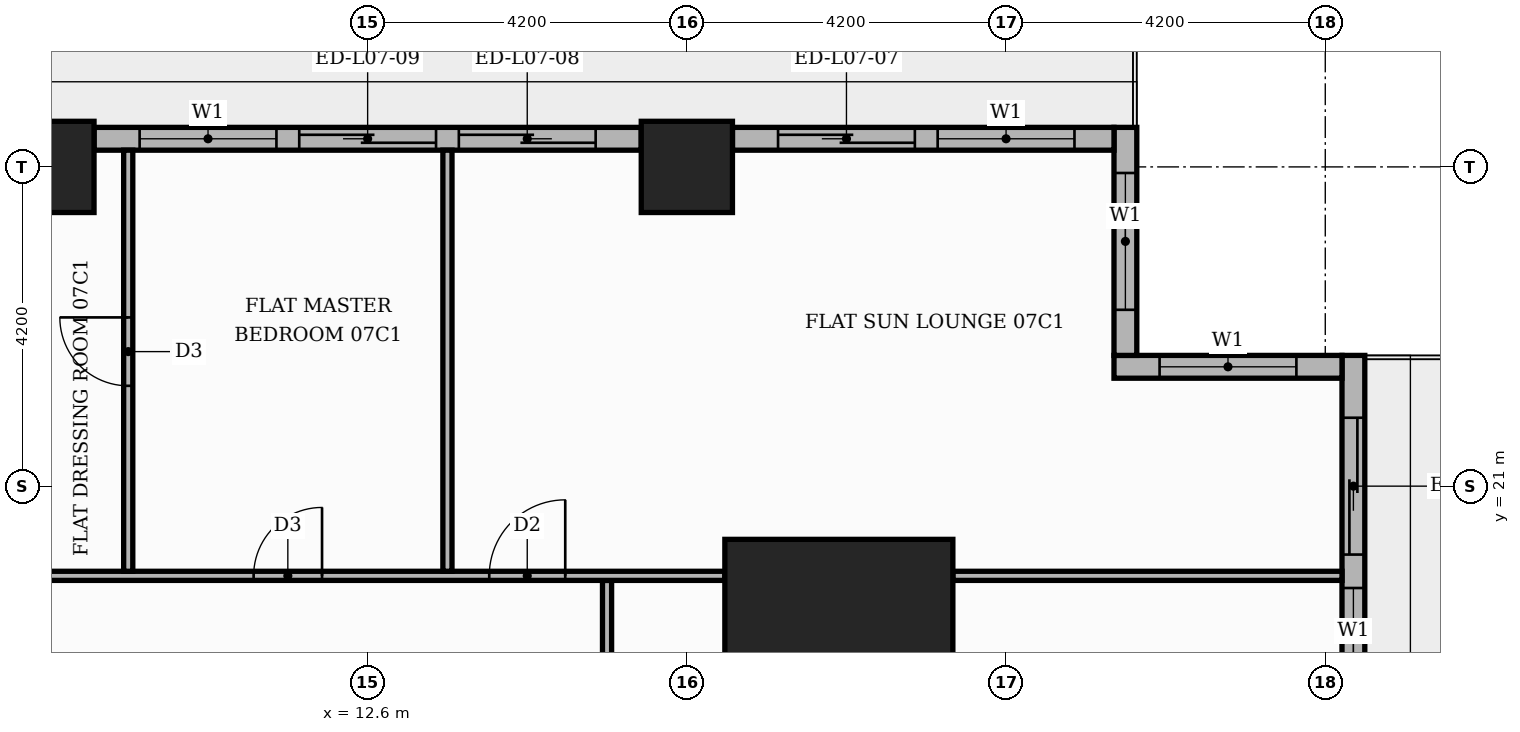
"""IFC4 building model, lengths in metres.
Left out: names, types, materials, properties, quantities, classifications, styles, units other than length and angle.
Written with IfcOpenShell. Run it as: python <this file> out.ifc"""

import sys

from ifc_helpers import new_model, si_unit, direction, frame, frame_2d, origin, origin_2d, place, context, subcontext, project, spatial, rectangle, extrude, element, fill, save


model = new_model("IFC4")
c1 = context("Model", 3, precision=1e-05, world=origin(), true_north=direction((0.0, 1.0)))
c2 = subcontext(c1, "Body", "Model", "MODEL_VIEW")
j1 = project(units=[si_unit("LENGTHUNIT", "METRE"), si_unit("PLANEANGLEUNIT", "RADIAN")], contexts=[c1])
p1 = place(None, origin())
s1 = spatial("IfcSite", under=j1, at=p1, CompositionType="ELEMENT")
p2 = place(p1, origin())
s2 = spatial("IfcBuilding", under=s1, at=p2, CompositionType="ELEMENT")
p3 = place(p2, frame((0.0, 0.0, 34.8)))
s3 = spatial("IfcBuildingStorey", under=s2, at=p3, CompositionType="ELEMENT", Elevation=34.8)
p4 = place(p3, frame((18.8, 18.8, 0.0), z_axis=(0.0, 0.0, 1.0), x_axis=(1.0, 0.0, 0.0)))
e1 = element("IfcColumn", 1, at=p4, inside=s3, PredefinedType="COLUMN", context=c2, shape_type="SweptSolid", body=[
    extrude(rectangle(XDim=3.0, YDim=3.0, at=origin_2d()), origin(), (0.0, 0.0, 1.0), 3.9),
])
for number, where, z_axis, x_axis in (
    (2, (8.4, 25.2, 0.0), (0.0, 0.0, 1.0), (1.0, 0.0, 0.0)),
    (3, (16.8, 25.2, 0.0), (0.0, 0.0, 1.0), (1.0, 0.0, 0.0)),
):
    element("IfcColumn", number, at=place(p3, frame(where, z_axis=z_axis, x_axis=x_axis)), inside=s3, PredefinedType="COLUMN", context=c2, shape_type="SweptSolid", body=[
        extrude(rectangle(XDim=1.2, YDim=1.2, at=origin_2d()), origin(), (0.0, 0.0, 1.0), 3.9),
    ])
p5 = place(p3, frame((25.57, 17.4, 0.0), z_axis=(0.0, 0.0, 1.0), x_axis=(0.0, 1.0, 0.0)))
e4 = element("IfcWall", 4, at=p5, inside=s3, PredefinedType="STANDARD", context=c2, shape_type="SweptSolid", body=[
    extrude(rectangle(XDim=5.32, YDim=0.3, at=frame_2d((2.66, 0.0))), origin(), (0.0, 0.0, 1.0), 3.48),
])
p6 = place(p5, frame((2.7, 0.0, 0.0)))
e5 = element("IfcOpeningElement", 5, at=p6, cuts=e4, PredefinedType="OPENING", context=c2, shape_type="SweptSolid", body=[
    extrude(rectangle(XDim=1.8, YDim=2.4, at=frame_2d((0.9, 1.2))), frame((0.0, 0.16, 0.0), z_axis=(0.0, -1.0, 0.0), x_axis=(1.0, 0.0, 0.0)), (0.0, 0.0, 1.0), 0.32),
])
p7 = place(p5, frame((0.46, 0.0, 0.9)))
e6 = element("IfcOpeningElement", 6, at=p7, cuts=e4, PredefinedType="OPENING", context=c2, shape_type="SweptSolid", body=[
    extrude(rectangle(XDim=1.8, YDim=2.1, at=frame_2d((0.9, 1.05))), frame((0.0, 0.16, 0.0), z_axis=(0.0, -1.0, 0.0), x_axis=(1.0, 0.0, 0.0)), (0.0, 0.0, 1.0), 0.32),
])
p8 = place(p3, frame((25.42, 22.57, 0.0), z_axis=(0.0, 0.0, 1.0), x_axis=(-1.0, 0.0, 0.0)))
e7 = element("IfcWall", 7, at=p8, inside=s3, PredefinedType="STANDARD", context=c2, shape_type="SweptSolid", body=[
    extrude(rectangle(XDim=3.0, YDim=0.3, at=frame_2d((1.5, 0.0))), origin(), (0.0, 0.0, 1.0), 3.48),
])
p9 = place(p8, frame((0.6, 0.0, 0.9)))
e8 = element("IfcOpeningElement", 8, at=p9, cuts=e7, PredefinedType="OPENING", context=c2, shape_type="SweptSolid", body=[
    extrude(rectangle(XDim=1.8, YDim=2.1, at=frame_2d((0.9, 1.05))), frame((0.0, 0.16, 0.0), z_axis=(0.0, -1.0, 0.0), x_axis=(1.0, 0.0, 0.0)), (0.0, 0.0, 1.0), 0.32),
])
p10 = place(p3, frame((22.57, 22.72, 0.0), z_axis=(0.0, 0.0, 1.0), x_axis=(0.0, 1.0, 0.0)))
e9 = element("IfcWall", 9, at=p10, inside=s3, PredefinedType="STANDARD", context=c2, shape_type="SweptSolid", body=[
    extrude(rectangle(XDim=3.0, YDim=0.3, at=frame_2d((1.5, 0.0))), origin(), (0.0, 0.0, 1.0), 3.48),
])
p11 = place(p10, frame((0.6, 0.0, 0.9)))
e10 = element("IfcOpeningElement", 10, at=p11, cuts=e9, PredefinedType="OPENING", context=c2, shape_type="SweptSolid", body=[
    extrude(rectangle(XDim=1.8, YDim=2.1, at=frame_2d((0.9, 1.05))), frame((0.0, 0.16, 0.0), z_axis=(0.0, -1.0, 0.0), x_axis=(1.0, 0.0, 0.0)), (0.0, 0.0, 1.0), 0.32),
])
p12 = place(p3, frame((22.42, 25.57, 0.0), z_axis=(0.0, 0.0, 1.0), x_axis=(-1.0, 0.0, 0.0)))
e11 = element("IfcWall", 11, at=p12, inside=s3, PredefinedType="STANDARD", context=c2, shape_type="SweptSolid", body=[
    extrude(rectangle(XDim=5.02, YDim=0.3, at=frame_2d((2.51, 0.0))), origin(), (0.0, 0.0, 1.0), 3.48),
])
p13 = place(p12, frame((0.52, 0.0, 0.9)))
e12 = element("IfcOpeningElement", 12, at=p13, cuts=e11, PredefinedType="OPENING", context=c2, shape_type="SweptSolid", body=[
    extrude(rectangle(XDim=1.8, YDim=2.1, at=frame_2d((0.9, 1.05))), frame((0.0, 0.16, 0.0), z_axis=(0.0, -1.0, 0.0), x_axis=(1.0, 0.0, 0.0)), (0.0, 0.0, 1.0), 0.32),
])
p14 = place(p12, frame((2.62, 0.0, 0.0)))
e13 = element("IfcOpeningElement", 13, at=p14, cuts=e11, PredefinedType="OPENING", context=c2, shape_type="SweptSolid", body=[
    extrude(rectangle(XDim=1.8, YDim=2.4, at=frame_2d((0.9, 1.2))), frame((0.0, 0.16, 0.0), z_axis=(0.0, -1.0, 0.0), x_axis=(1.0, 0.0, 0.0)), (0.0, 0.0, 1.0), 0.32),
])
p15 = place(p3, frame((16.2, 25.57, 0.0), z_axis=(0.0, 0.0, 1.0), x_axis=(-1.0, 0.0, 0.0)))
e14 = element("IfcWall", 14, at=p15, inside=s3, PredefinedType="STANDARD", context=c2, shape_type="SweptSolid", body=[
    extrude(rectangle(XDim=7.2, YDim=0.3, at=frame_2d((3.6, 0.0))), origin(), (0.0, 0.0, 1.0), 3.48),
])
p16 = place(p15, frame((0.6, 0.0, 0.0)))
e15 = element("IfcOpeningElement", 15, at=p16, cuts=e14, PredefinedType="OPENING", context=c2, shape_type="SweptSolid", body=[
    extrude(rectangle(XDim=1.8, YDim=2.4, at=frame_2d((0.9, 1.2))), frame((0.0, 0.16, 0.0), z_axis=(0.0, -1.0, 0.0), x_axis=(1.0, 0.0, 0.0)), (0.0, 0.0, 1.0), 0.32),
])
p17 = place(p15, frame((2.7, 0.0, 0.0)))
e16 = element("IfcOpeningElement", 16, at=p17, cuts=e14, PredefinedType="OPENING", context=c2, shape_type="SweptSolid", body=[
    extrude(rectangle(XDim=1.8, YDim=2.4, at=frame_2d((0.9, 1.2))), frame((0.0, 0.16, 0.0), z_axis=(0.0, -1.0, 0.0), x_axis=(1.0, 0.0, 0.0)), (0.0, 0.0, 1.0), 0.32),
])
p18 = place(p15, frame((4.8, 0.0, 0.9)))
e17 = element("IfcOpeningElement", 17, at=p18, cuts=e14, PredefinedType="OPENING", context=c2, shape_type="SweptSolid", body=[
    extrude(rectangle(XDim=1.8, YDim=2.1, at=frame_2d((0.9, 1.05))), frame((0.0, 0.16, 0.0), z_axis=(0.0, -1.0, 0.0), x_axis=(1.0, 0.0, 0.0)), (0.0, 0.0, 1.0), 0.32),
])
p19 = place(p3, frame((15.75, 13.75, 0.0), z_axis=(0.0, 0.0, 1.0), x_axis=(0.0, 1.0, 0.0)))
e18 = element("IfcWall", 18, at=p19, inside=s3, PredefinedType="PARTITIONING", context=c2, shape_type="SweptSolid", body=[
    extrude(rectangle(XDim=6.01, YDim=0.12, at=frame_2d((3.005, 0.0))), origin(), (0.0, 0.0, 1.0), 3.48),
])
p20 = place(p19, frame((2.485, 0.0, 0.0)))
e19 = element("IfcOpeningElement", 19, at=p20, cuts=e18, PredefinedType="OPENING", context=c2, shape_type="SweptSolid", body=[
    extrude(rectangle(XDim=1.0, YDim=2.1, at=frame_2d((0.5, 1.05))), frame((0.0, 0.07, 0.0), z_axis=(0.0, -1.0, 0.0), x_axis=(1.0, 0.0, 0.0)), (0.0, 0.0, 1.0), 0.14),
])
p21 = place(p3, frame((5.35, 19.82, 0.0), z_axis=(0.0, 0.0, 1.0), x_axis=(1.0, 0.0, 0.0)))
e20 = element("IfcWall", 20, at=p21, inside=s3, PredefinedType="PARTITIONING", context=c2, shape_type="SweptSolid", body=[
    extrude(rectangle(XDim=11.95, YDim=0.12, at=frame_2d((5.975, 0.0))), origin(), (0.0, 0.0, 1.0), 3.48),
])
p22 = place(p21, frame((8.85, 0.0, 0.0)))
e21 = element("IfcOpeningElement", 21, at=p22, cuts=e20, PredefinedType="OPENING", context=c2, shape_type="SweptSolid", body=[
    extrude(rectangle(XDim=1.0, YDim=2.1, at=frame_2d((0.5, 1.05))), frame((0.0, 0.07, 0.0), z_axis=(0.0, -1.0, 0.0), x_axis=(1.0, 0.0, 0.0)), (0.0, 0.0, 1.0), 0.14),
])
p23 = place(p21, frame((5.75, 0.0, 0.0)))
e22 = element("IfcOpeningElement", 22, at=p23, cuts=e20, PredefinedType="OPENING", context=c2, shape_type="SweptSolid", body=[
    extrude(rectangle(XDim=0.9, YDim=2.1, at=frame_2d((0.45, 1.05))), frame((0.0, 0.07, 0.0), z_axis=(0.0, -1.0, 0.0), x_axis=(1.0, 0.0, 0.0)), (0.0, 0.0, 1.0), 0.14),
])
p24 = place(p3, frame((20.3, 19.82, 0.0), z_axis=(0.0, 0.0, 1.0), x_axis=(1.0, 0.0, 0.0)))
e23 = element("IfcWall", 23, at=p24, inside=s3, PredefinedType="PARTITIONING", context=c2, shape_type="SweptSolid", body=[
    extrude(rectangle(XDim=5.12, YDim=0.12, at=frame_2d((2.56, 0.0))), origin(), (0.0, 0.0, 1.0), 3.48),
])
p25 = place(p3, frame((9.45, 19.88, 0.0), z_axis=(0.0, 0.0, 1.0), x_axis=(0.0, 1.0, 0.0)))
e24 = element("IfcWall", 24, at=p25, inside=s3, PredefinedType="PARTITIONING", context=c2, shape_type="SweptSolid", body=[
    extrude(rectangle(XDim=5.54, YDim=0.12, at=frame_2d((2.77, 0.0))), origin(), (0.0, 0.0, 1.0), 3.48),
])
p26 = place(p25, frame((2.44, 0.0, 0.0)))
e25 = element("IfcOpeningElement", 25, at=p26, cuts=e24, PredefinedType="OPENING", context=c2, shape_type="SweptSolid", body=[
    extrude(rectangle(XDim=0.9, YDim=2.1, at=frame_2d((0.45, 1.05))), frame((0.0, 0.07, 0.0), z_axis=(0.0, -1.0, 0.0), x_axis=(1.0, 0.0, 0.0)), (0.0, 0.0, 1.0), 0.14),
])
p27 = place(p3, frame((13.65, 19.88, 0.0), z_axis=(0.0, 0.0, 1.0), x_axis=(0.0, 1.0, 0.0)))
e26 = element("IfcWall", 26, at=p27, inside=s3, PredefinedType="PARTITIONING", context=c2, shape_type="SweptSolid", body=[
    extrude(rectangle(XDim=5.54, YDim=0.12, at=frame_2d((2.77, 0.0))), origin(), (0.0, 0.0, 1.0), 3.48),
])
p28 = place(p6, origin())
e27 = element("IfcDoor", 27, at=p28, inside=s3, OperationType="SLIDING_TO_LEFT", PredefinedType="DOOR", context=c2, shape_type="SweptSolid", body=[
    extrude(rectangle(XDim=1.8, YDim=2.4, at=frame_2d((0.9, 1.2))), frame((0.0, 0.025, 0.0), z_axis=(0.0, -1.0, 0.0), x_axis=(1.0, 0.0, 0.0)), (0.0, 0.0, 1.0), 0.05),
])
fill(e5, e27)
p29 = place(p7, origin())
e28 = element("IfcWindow", 28, at=p29, inside=s3, PartitioningType="SINGLE_PANEL", PredefinedType="WINDOW", context=c2, shape_type="SweptSolid", body=[
    extrude(rectangle(XDim=1.8, YDim=2.1, at=frame_2d((0.9, 1.05))), frame((0.0, 0.03, 0.0), z_axis=(0.0, -1.0, 0.0), x_axis=(1.0, 0.0, 0.0)), (0.0, 0.0, 1.0), 0.06),
])
fill(e6, e28)
p30 = place(p9, origin())
e29 = element("IfcWindow", 29, at=p30, inside=s3, PartitioningType="SINGLE_PANEL", PredefinedType="WINDOW", context=c2, shape_type="SweptSolid", body=[
    extrude(rectangle(XDim=1.8, YDim=2.1, at=frame_2d((0.9, 1.05))), frame((0.0, 0.03, 0.0), z_axis=(0.0, -1.0, 0.0), x_axis=(1.0, 0.0, 0.0)), (0.0, 0.0, 1.0), 0.06),
])
fill(e8, e29)
p31 = place(p11, origin())
e30 = element("IfcWindow", 30, at=p31, inside=s3, PartitioningType="SINGLE_PANEL", PredefinedType="WINDOW", context=c2, shape_type="SweptSolid", body=[
    extrude(rectangle(XDim=1.8, YDim=2.1, at=frame_2d((0.9, 1.05))), frame((0.0, 0.03, 0.0), z_axis=(0.0, -1.0, 0.0), x_axis=(1.0, 0.0, 0.0)), (0.0, 0.0, 1.0), 0.06),
])
fill(e10, e30)
p32 = place(p13, origin())
e31 = element("IfcWindow", 31, at=p32, inside=s3, PartitioningType="SINGLE_PANEL", PredefinedType="WINDOW", context=c2, shape_type="SweptSolid", body=[
    extrude(rectangle(XDim=1.8, YDim=2.1, at=frame_2d((0.9, 1.05))), frame((0.0, 0.03, 0.0), z_axis=(0.0, -1.0, 0.0), x_axis=(1.0, 0.0, 0.0)), (0.0, 0.0, 1.0), 0.06),
])
fill(e12, e31)
p33 = place(p14, origin())
e32 = element("IfcDoor", 32, at=p33, inside=s3, OperationType="SLIDING_TO_RIGHT", PredefinedType="DOOR", context=c2, shape_type="SweptSolid", body=[
    extrude(rectangle(XDim=1.8, YDim=2.4, at=frame_2d((0.9, 1.2))), frame((0.0, 0.025, 0.0), z_axis=(0.0, -1.0, 0.0), x_axis=(1.0, 0.0, 0.0)), (0.0, 0.0, 1.0), 0.05),
])
fill(e13, e32)
p34 = place(p16, origin())
e33 = element("IfcDoor", 33, at=p34, inside=s3, OperationType="SLIDING_TO_LEFT", PredefinedType="DOOR", context=c2, shape_type="SweptSolid", body=[
    extrude(rectangle(XDim=1.8, YDim=2.4, at=frame_2d((0.9, 1.2))), frame((0.0, 0.025, 0.0), z_axis=(0.0, -1.0, 0.0), x_axis=(1.0, 0.0, 0.0)), (0.0, 0.0, 1.0), 0.05),
])
fill(e15, e33)
p35 = place(p17, origin())
e34 = element("IfcDoor", 34, at=p35, inside=s3, OperationType="SLIDING_TO_RIGHT", PredefinedType="DOOR", context=c2, shape_type="SweptSolid", body=[
    extrude(rectangle(XDim=1.8, YDim=2.4, at=frame_2d((0.9, 1.2))), frame((0.0, 0.025, 0.0), z_axis=(0.0, -1.0, 0.0), x_axis=(1.0, 0.0, 0.0)), (0.0, 0.0, 1.0), 0.05),
])
fill(e16, e34)
p36 = place(p18, origin())
e35 = element("IfcWindow", 35, at=p36, inside=s3, PartitioningType="SINGLE_PANEL", PredefinedType="WINDOW", context=c2, shape_type="SweptSolid", body=[
    extrude(rectangle(XDim=1.8, YDim=2.1, at=frame_2d((0.9, 1.05))), frame((0.0, 0.03, 0.0), z_axis=(0.0, -1.0, 0.0), x_axis=(1.0, 0.0, 0.0)), (0.0, 0.0, 1.0), 0.06),
])
fill(e17, e35)
p37 = place(p22, origin())
e36 = element("IfcDoor", 36, at=p37, inside=s3, OperationType="SINGLE_SWING_RIGHT", PredefinedType="DOOR", context=c2, shape_type="SweptSolid", body=[
    extrude(rectangle(XDim=1.0, YDim=2.1, at=frame_2d((0.5, 1.05))), frame((0.0, 0.025, 0.0), z_axis=(0.0, -1.0, 0.0), x_axis=(1.0, 0.0, 0.0)), (0.0, 0.0, 1.0), 0.05),
])
fill(e21, e36)
p38 = place(p23, origin())
e37 = element("IfcDoor", 37, at=p38, inside=s3, OperationType="SINGLE_SWING_RIGHT", PredefinedType="DOOR", context=c2, shape_type="SweptSolid", body=[
    extrude(rectangle(XDim=0.9, YDim=2.1, at=frame_2d((0.45, 1.05))), frame((0.0, 0.025, 0.0), z_axis=(0.0, -1.0, 0.0), x_axis=(1.0, 0.0, 0.0)), (0.0, 0.0, 1.0), 0.05),
])
fill(e22, e37)
p39 = place(p26, origin())
e38 = element("IfcDoor", 38, at=p39, inside=s3, OperationType="SINGLE_SWING_RIGHT", PredefinedType="DOOR", context=c2, shape_type="SweptSolid", body=[
    extrude(rectangle(XDim=0.9, YDim=2.1, at=frame_2d((0.45, 1.05))), frame((0.0, 0.025, 0.0), z_axis=(0.0, -1.0, 0.0), x_axis=(1.0, 0.0, 0.0)), (0.0, 0.0, 1.0), 0.05),
])
fill(e25, e38)
save(model, sys.argv[1])
